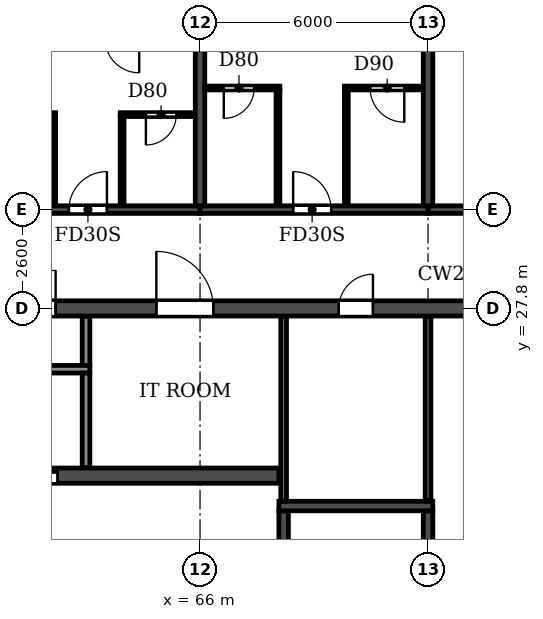
"""IFC4 building model, lengths in metres.
Left out: names, types, materials, properties, quantities, classifications, styles, units other than length and angle.
Written with IfcOpenShell. Run it as: python <this file> out.ifc"""

import sys

from ifc_helpers import new_model, si_unit, direction, frame, frame_2d, origin, place, context, subcontext, project, spatial, rectangle, extrude, element, fill, save


model = new_model("IFC4")
c1 = context("Model", 3, precision=1e-05, world=origin(), true_north=direction((0.0, 1.0)))
c2 = subcontext(c1, "Body", "Model", "MODEL_VIEW")
j1 = project(units=[si_unit("LENGTHUNIT", "METRE"), si_unit("PLANEANGLEUNIT", "RADIAN")], contexts=[c1])
p1 = place(None, origin())
s1 = spatial("IfcSite", under=j1, at=p1, CompositionType="ELEMENT")
p2 = place(p1, origin())
s2 = spatial("IfcBuilding", under=s1, at=p2, CompositionType="ELEMENT")
p3 = place(p2, frame((0.0, 0.0, 181.8)))
s3 = spatial("IfcBuildingStorey", under=s2, at=p3, CompositionType="ELEMENT", Elevation=181.8)
for number, where, z_axis, x_axis in (
    (1, (66.0, 30.5, 0.0), (0.0, 0.0, 1.0), (0.0, 1.0, 0.0)),
    (2, (72.0, 30.5, 0.0), (0.0, 0.0, 1.0), (0.0, 1.0, 0.0)),
):
    element("IfcWall", number, at=place(p3, frame(where, z_axis=z_axis, x_axis=x_axis)), inside=s3, PredefinedType="SHEAR", context=c2, shape_type="SweptSolid", body=[
        extrude(rectangle(XDim=10.5, YDim=0.25, at=frame_2d((5.25, 0.0))), origin(), (0.0, 0.0, 1.0), 3.08),
    ])
p4 = place(p3, frame((60.0, 30.4, 0.0), z_axis=(0.0, 0.0, 1.0), x_axis=(1.0, 0.0, 0.0)))
e3 = element("IfcWall", 3, at=p4, inside=s3, PredefinedType="SHEAR", context=c2, shape_type="SweptSolid", body=[
    extrude(rectangle(XDim=6.0, YDim=0.2, at=frame_2d((3.0, 0.0))), origin(), (0.0, 0.0, 1.0), 2.48),
])
p5 = place(p4, frame((2.55, 0.0, 0.0)))
e4 = element("IfcOpeningElement", 4, at=p5, cuts=e3, PredefinedType="OPENING", context=c2, shape_type="SweptSolid", body=[
    extrude(rectangle(XDim=1.0, YDim=2.1, at=frame_2d((0.5, 1.05))), frame((0.0, 0.11, 0.0), z_axis=(0.0, -1.0, 0.0), x_axis=(1.0, 0.0, 0.0)), (0.0, 0.0, 1.0), 0.22),
])
p6 = place(p3, frame((66.0, 30.4, 0.0), z_axis=(0.0, 0.0, 1.0), x_axis=(1.0, 0.0, 0.0)))
e5 = element("IfcWall", 5, at=p6, inside=s3, PredefinedType="SHEAR", context=c2, shape_type="SweptSolid", body=[
    extrude(rectangle(XDim=6.0, YDim=0.2, at=frame_2d((3.0, 0.0))), origin(), (0.0, 0.0, 1.0), 2.48),
])
p7 = place(p6, frame((2.45, 0.0, 0.0)))
e6 = element("IfcOpeningElement", 6, at=p7, cuts=e5, PredefinedType="OPENING", context=c2, shape_type="SweptSolid", body=[
    extrude(rectangle(XDim=1.0, YDim=2.1, at=frame_2d((0.5, 1.05))), frame((0.0, 0.11, 0.0), z_axis=(0.0, -1.0, 0.0), x_axis=(1.0, 0.0, 0.0)), (0.0, 0.0, 1.0), 0.22),
])
p8 = place(p3, frame((72.0, 30.4, 0.0), z_axis=(0.0, 0.0, 1.0), x_axis=(1.0, 0.0, 0.0)))
e7 = element("IfcWall", 7, at=p8, inside=s3, PredefinedType="SHEAR", context=c2, shape_type="SweptSolid", body=[
    extrude(rectangle(XDim=6.0, YDim=0.2, at=frame_2d((3.0, 0.0))), origin(), (0.0, 0.0, 1.0), 2.48),
])
p9 = place(p8, frame((2.55, 0.0, 0.0)))
e8 = element("IfcOpeningElement", 8, at=p9, cuts=e7, PredefinedType="OPENING", context=c2, shape_type="SweptSolid", body=[
    extrude(rectangle(XDim=1.0, YDim=2.1, at=frame_2d((0.5, 1.05))), frame((0.0, 0.11, 0.0), z_axis=(0.0, -1.0, 0.0), x_axis=(1.0, 0.0, 0.0)), (0.0, 0.0, 1.0), 0.22),
])
p10 = place(p3, frame((18.2, 27.8, 0.0), z_axis=(0.0, 0.0, 1.0), x_axis=(1.0, 0.0, 0.0)))
e9 = element("IfcWall", 9, at=p10, inside=s3, PredefinedType="SOLIDWALL", context=c2, shape_type="SweptSolid", body=[
    extrude(rectangle(XDim=65.6, YDim=0.4, at=frame_2d((32.8, 0.0))), origin(), (0.0, 0.0, 1.0), 3.08),
])
p11 = place(p10, frame((0.7, 0.0, 0.0)))
e10 = element("IfcOpeningElement", 10, at=p11, cuts=e9, PredefinedType="OPENING", context=c2, shape_type="SweptSolid", body=[
    extrude(rectangle(XDim=1.0, YDim=2.1, at=frame_2d((0.5, 1.05))), frame((0.0, 0.21, 0.0), z_axis=(0.0, -1.0, 0.0), x_axis=(1.0, 0.0, 0.0)), (0.0, 0.0, 1.0), 0.42),
])
p12 = place(p10, frame((4.05, 0.0, 0.0)))
e11 = element("IfcOpeningElement", 11, at=p12, cuts=e9, PredefinedType="OPENING", context=c2, shape_type="SweptSolid", body=[
    extrude(rectangle(XDim=0.9, YDim=2.1, at=frame_2d((0.45, 1.05))), frame((0.0, 0.21, 0.0), z_axis=(0.0, -1.0, 0.0), x_axis=(1.0, 0.0, 0.0)), (0.0, 0.0, 1.0), 0.42),
])
p13 = place(p10, frame((13.25, 0.0, 0.0)))
e12 = element("IfcOpeningElement", 12, at=p13, cuts=e9, PredefinedType="OPENING", context=c2, shape_type="SweptSolid", body=[
    extrude(rectangle(XDim=0.9, YDim=2.1, at=frame_2d((0.45, 1.05))), frame((0.0, 0.21, 0.0), z_axis=(0.0, -1.0, 0.0), x_axis=(1.0, 0.0, 0.0)), (0.0, 0.0, 1.0), 0.42),
])
p14 = place(p10, frame((19.0, 0.0, 0.0)))
e13 = element("IfcOpeningElement", 13, at=p14, cuts=e9, PredefinedType="OPENING", context=c2, shape_type="SweptSolid", body=[
    extrude(rectangle(XDim=1.0, YDim=2.1, at=frame_2d((0.5, 1.05))), frame((0.0, 0.21, 0.0), z_axis=(0.0, -1.0, 0.0), x_axis=(1.0, 0.0, 0.0)), (0.0, 0.0, 1.0), 0.42),
])
p15 = place(p10, frame((24.2, 0.0, 0.0)))
e14 = element("IfcOpeningElement", 14, at=p15, cuts=e9, PredefinedType="OPENING", context=c2, shape_type="SweptSolid", body=[
    extrude(rectangle(XDim=1.0, YDim=2.1, at=frame_2d((0.5, 1.05))), frame((0.0, 0.21, 0.0), z_axis=(0.0, -1.0, 0.0), x_axis=(1.0, 0.0, 0.0)), (0.0, 0.0, 1.0), 0.42),
])
p16 = place(p10, frame((29.4, 0.0, 0.0)))
e15 = element("IfcOpeningElement", 15, at=p16, cuts=e9, PredefinedType="OPENING", context=c2, shape_type="SweptSolid", body=[
    extrude(rectangle(XDim=1.0, YDim=2.1, at=frame_2d((0.5, 1.05))), frame((0.0, 0.21, 0.0), z_axis=(0.0, -1.0, 0.0), x_axis=(1.0, 0.0, 0.0)), (0.0, 0.0, 1.0), 0.42),
])
p17 = place(p10, frame((32.3, 0.0, 0.0)))
e16 = element("IfcOpeningElement", 16, at=p17, cuts=e9, PredefinedType="OPENING", context=c2, shape_type="SweptSolid", body=[
    extrude(rectangle(XDim=1.0, YDim=2.1, at=frame_2d((0.5, 1.05))), frame((0.0, 0.21, 0.0), z_axis=(0.0, -1.0, 0.0), x_axis=(1.0, 0.0, 0.0)), (0.0, 0.0, 1.0), 0.42),
])
p18 = place(p10, frame((36.5, 0.0, 0.0)))
e17 = element("IfcOpeningElement", 17, at=p18, cuts=e9, PredefinedType="OPENING", context=c2, shape_type="SweptSolid", body=[
    extrude(rectangle(XDim=1.0, YDim=2.1, at=frame_2d((0.5, 1.05))), frame((0.0, 0.21, 0.0), z_axis=(0.0, -1.0, 0.0), x_axis=(1.0, 0.0, 0.0)), (0.0, 0.0, 1.0), 0.42),
])
p19 = place(p10, frame((40.4, 0.0, 0.0)))
e18 = element("IfcOpeningElement", 18, at=p19, cuts=e9, PredefinedType="OPENING", context=c2, shape_type="SweptSolid", body=[
    extrude(rectangle(XDim=1.0, YDim=2.1, at=frame_2d((0.5, 1.05))), frame((0.0, 0.21, 0.0), z_axis=(0.0, -1.0, 0.0), x_axis=(1.0, 0.0, 0.0)), (0.0, 0.0, 1.0), 0.42),
])
p20 = place(p10, frame((43.0, 0.0, 0.0)))
e19 = element("IfcOpeningElement", 19, at=p20, cuts=e9, PredefinedType="OPENING", context=c2, shape_type="SweptSolid", body=[
    extrude(rectangle(XDim=1.0, YDim=2.1, at=frame_2d((0.5, 1.05))), frame((0.0, 0.21, 0.0), z_axis=(0.0, -1.0, 0.0), x_axis=(1.0, 0.0, 0.0)), (0.0, 0.0, 1.0), 0.42),
])
p21 = place(p10, frame((46.65, 0.0, 0.0)))
e20 = element("IfcOpeningElement", 20, at=p21, cuts=e9, PredefinedType="OPENING", context=c2, shape_type="SweptSolid", body=[
    extrude(rectangle(XDim=1.5, YDim=2.1, at=frame_2d((0.75, 1.05))), frame((0.0, 0.21, 0.0), z_axis=(0.0, -1.0, 0.0), x_axis=(1.0, 0.0, 0.0)), (0.0, 0.0, 1.0), 0.42),
])
p22 = place(p10, frame((51.45, 0.0, 0.0)))
e21 = element("IfcOpeningElement", 21, at=p22, cuts=e9, PredefinedType="OPENING", context=c2, shape_type="SweptSolid", body=[
    extrude(rectangle(XDim=0.9, YDim=2.1, at=frame_2d((0.45, 1.05))), frame((0.0, 0.21, 0.0), z_axis=(0.0, -1.0, 0.0), x_axis=(1.0, 0.0, 0.0)), (0.0, 0.0, 1.0), 0.42),
])
p23 = place(p10, frame((60.65, 0.0, 0.0)))
e22 = element("IfcOpeningElement", 22, at=p23, cuts=e9, PredefinedType="OPENING", context=c2, shape_type="SweptSolid", body=[
    extrude(rectangle(XDim=0.9, YDim=2.1, at=frame_2d((0.45, 1.05))), frame((0.0, 0.21, 0.0), z_axis=(0.0, -1.0, 0.0), x_axis=(1.0, 0.0, 0.0)), (0.0, 0.0, 1.0), 0.42),
])
p24 = place(p10, frame((63.9, 0.0, 0.0)))
e23 = element("IfcOpeningElement", 23, at=p24, cuts=e9, PredefinedType="OPENING", context=c2, shape_type="SweptSolid", body=[
    extrude(rectangle(XDim=1.0, YDim=2.1, at=frame_2d((0.5, 1.05))), frame((0.0, 0.21, 0.0), z_axis=(0.0, -1.0, 0.0), x_axis=(1.0, 0.0, 0.0)), (0.0, 0.0, 1.0), 0.42),
])
p25 = place(p3, frame((33.925, 23.4, 0.0), z_axis=(0.0, 0.0, 1.0), x_axis=(1.0, 0.0, 0.0)))
e24 = element("IfcWall", 24, at=p25, inside=s3, PredefinedType="SOLIDWALL", context=c2, shape_type="SweptSolid", body=[
    extrude(rectangle(XDim=34.15, YDim=0.4, at=frame_2d((17.075, 0.0))), origin(), (0.0, 0.0, 1.0), 3.08),
])
p26 = place(p25, frame((16.175, 0.0, 0.0)))
e25 = element("IfcOpeningElement", 25, at=p26, cuts=e24, PredefinedType="OPENING", context=c2, shape_type="SweptSolid", body=[
    extrude(rectangle(XDim=1.8, YDim=2.1, at=frame_2d((0.9, 1.05))), frame((0.0, 0.21, 0.0), z_axis=(0.0, -1.0, 0.0), x_axis=(1.0, 0.0, 0.0)), (0.0, 0.0, 1.0), 0.42),
])
p27 = place(p25, frame((0.625, 0.0, 0.0)))
e26 = element("IfcOpeningElement", 26, at=p27, cuts=e24, PredefinedType="OPENING", context=c2, shape_type="SweptSolid", body=[
    extrude(rectangle(XDim=1.1, YDim=2.1, at=frame_2d((0.55, 1.05))), frame((0.0, 0.21, 0.0), z_axis=(0.0, -1.0, 0.0), x_axis=(1.0, 0.0, 0.0)), (0.0, 0.0, 1.0), 0.42),
])
p28 = place(p25, frame((3.225, 0.0, 0.0)))
e27 = element("IfcOpeningElement", 27, at=p28, cuts=e24, PredefinedType="OPENING", context=c2, shape_type="SweptSolid", body=[
    extrude(rectangle(XDim=1.1, YDim=2.1, at=frame_2d((0.55, 1.05))), frame((0.0, 0.21, 0.0), z_axis=(0.0, -1.0, 0.0), x_axis=(1.0, 0.0, 0.0)), (0.0, 0.0, 1.0), 0.42),
])
p29 = place(p25, frame((5.825, 0.0, 0.0)))
e28 = element("IfcOpeningElement", 28, at=p29, cuts=e24, PredefinedType="OPENING", context=c2, shape_type="SweptSolid", body=[
    extrude(rectangle(XDim=1.1, YDim=2.1, at=frame_2d((0.55, 1.05))), frame((0.0, 0.21, 0.0), z_axis=(0.0, -1.0, 0.0), x_axis=(1.0, 0.0, 0.0)), (0.0, 0.0, 1.0), 0.42),
])
p30 = place(p25, frame((8.425, 0.0, 0.0)))
e29 = element("IfcOpeningElement", 29, at=p30, cuts=e24, PredefinedType="OPENING", context=c2, shape_type="SweptSolid", body=[
    extrude(rectangle(XDim=1.1, YDim=2.1, at=frame_2d((0.55, 1.05))), frame((0.0, 0.21, 0.0), z_axis=(0.0, -1.0, 0.0), x_axis=(1.0, 0.0, 0.0)), (0.0, 0.0, 1.0), 0.42),
])
p31 = place(p25, frame((11.025, 0.0, 0.0)))
e30 = element("IfcOpeningElement", 30, at=p31, cuts=e24, PredefinedType="OPENING", context=c2, shape_type="SweptSolid", body=[
    extrude(rectangle(XDim=1.1, YDim=2.1, at=frame_2d((0.55, 1.05))), frame((0.0, 0.21, 0.0), z_axis=(0.0, -1.0, 0.0), x_axis=(1.0, 0.0, 0.0)), (0.0, 0.0, 1.0), 0.42),
])
p32 = place(p25, frame((13.625, 0.0, 0.0)))
e31 = element("IfcOpeningElement", 31, at=p32, cuts=e24, PredefinedType="OPENING", context=c2, shape_type="SweptSolid", body=[
    extrude(rectangle(XDim=1.1, YDim=2.1, at=frame_2d((0.55, 1.05))), frame((0.0, 0.21, 0.0), z_axis=(0.0, -1.0, 0.0), x_axis=(1.0, 0.0, 0.0)), (0.0, 0.0, 1.0), 0.42),
])
p33 = place(p25, frame((27.225, 0.0, 0.0)))
e32 = element("IfcOpeningElement", 32, at=p33, cuts=e24, PredefinedType="OPENING", context=c2, shape_type="SweptSolid", body=[
    extrude(rectangle(XDim=1.1, YDim=2.1, at=frame_2d((0.55, 1.05))), frame((0.0, 0.21, 0.0), z_axis=(0.0, -1.0, 0.0), x_axis=(1.0, 0.0, 0.0)), (0.0, 0.0, 1.0), 0.42),
])
p34 = place(p3, frame((68.2, 14.8, 0.0), z_axis=(0.0, 0.0, 1.0), x_axis=(0.0, 1.0, 0.0)))
e33 = element("IfcWall", 33, at=p34, inside=s3, PredefinedType="SOLIDWALL", context=c2, shape_type="SweptSolid", body=[
    extrude(rectangle(XDim=7.675, YDim=0.25, at=frame_2d((3.837, 0.0))), origin(), (0.0, 0.0, 1.0), 3.08),
])
p35 = place(p34, frame((0.5, 0.0, 0.0)))
e34 = element("IfcOpeningElement", 34, at=p35, cuts=e33, PredefinedType="OPENING", context=c2, shape_type="SweptSolid", body=[
    extrude(rectangle(XDim=1.0, YDim=2.1, at=frame_2d((0.5, 1.05))), frame((0.0, 0.135, 0.0), z_axis=(0.0, -1.0, 0.0), x_axis=(1.0, 0.0, 0.0)), (0.0, 0.0, 1.0), 0.27),
])
p36 = place(p3, frame((72.0, 14.8, 0.0), z_axis=(0.0, 0.0, 1.0), x_axis=(0.0, 1.0, 0.0)))
e35 = element("IfcWall", 35, at=p36, inside=s3, PredefinedType="SOLIDWALL", context=c2, shape_type="SweptSolid", body=[
    extrude(rectangle(XDim=7.675, YDim=0.25, at=frame_2d((3.837, 0.0))), origin(), (0.0, 0.0, 1.0), 3.08),
])
p37 = place(p3, frame((68.075, 22.6, 0.0), z_axis=(0.0, 0.0, 1.0), x_axis=(1.0, 0.0, 0.0)))
e36 = element("IfcWall", 36, at=p37, inside=s3, PredefinedType="SOLIDWALL", context=c2, shape_type="SweptSolid", body=[
    extrude(rectangle(XDim=4.05, YDim=0.25, at=frame_2d((2.025, 0.0))), origin(), (0.0, 0.0, 1.0), 3.08),
])
p38 = place(p3, frame((60.135, 32.9, 0.0), z_axis=(0.0, 0.0, 1.0), x_axis=(1.0, 0.0, 0.0)))
e37 = element("IfcWall", 37, at=p38, inside=s3, PredefinedType="PARTITIONING", context=c2, shape_type="SweptSolid", body=[
    extrude(rectangle(XDim=2.065, YDim=0.1, at=frame_2d((1.032, 0.0))), origin(), (0.0, 0.0, 1.0), 3.08),
])
p39 = place(p38, frame((0.49, 0.0, 0.0)))
e38 = element("IfcOpeningElement", 38, at=p39, cuts=e37, PredefinedType="OPENING", context=c2, shape_type="SweptSolid", body=[
    extrude(rectangle(XDim=0.9, YDim=2.1, at=frame_2d((0.45, 1.05))), frame((0.0, 0.06, 0.0), z_axis=(0.0, -1.0, 0.0), x_axis=(1.0, 0.0, 0.0)), (0.0, 0.0, 1.0), 0.12),
])
p40 = place(p3, frame((63.9, 32.9, 0.0), z_axis=(0.0, 0.0, 1.0), x_axis=(1.0, 0.0, 0.0)))
e39 = element("IfcWall", 39, at=p40, inside=s3, PredefinedType="PARTITIONING", context=c2, shape_type="SweptSolid", body=[
    extrude(rectangle(XDim=1.965, YDim=0.1, at=frame_2d((0.982, 0.0))), origin(), (0.0, 0.0, 1.0), 3.08),
])
p41 = place(p40, frame((0.675, 0.0, 0.0)))
e40 = element("IfcOpeningElement", 40, at=p41, cuts=e39, PredefinedType="OPENING", context=c2, shape_type="SweptSolid", body=[
    extrude(rectangle(XDim=0.8, YDim=2.1, at=frame_2d((0.4, 1.05))), frame((0.0, 0.06, 0.0), z_axis=(0.0, -1.0, 0.0), x_axis=(1.0, 0.0, 0.0)), (0.0, 0.0, 1.0), 0.12),
])
p42 = place(p3, frame((66.135, 33.6, 0.0), z_axis=(0.0, 0.0, 1.0), x_axis=(1.0, 0.0, 0.0)))
e41 = element("IfcWall", 41, at=p42, inside=s3, PredefinedType="PARTITIONING", context=c2, shape_type="SweptSolid", body=[
    extrude(rectangle(XDim=1.965, YDim=0.1, at=frame_2d((0.982, 0.0))), origin(), (0.0, 0.0, 1.0), 3.08),
])
p43 = place(p42, frame((0.49, 0.0, 0.0)))
e42 = element("IfcOpeningElement", 42, at=p43, cuts=e41, PredefinedType="OPENING", context=c2, shape_type="SweptSolid", body=[
    extrude(rectangle(XDim=0.8, YDim=2.1, at=frame_2d((0.4, 1.05))), frame((0.0, 0.06, 0.0), z_axis=(0.0, -1.0, 0.0), x_axis=(1.0, 0.0, 0.0)), (0.0, 0.0, 1.0), 0.12),
])
p44 = place(p3, frame((69.8, 33.6, 0.0), z_axis=(0.0, 0.0, 1.0), x_axis=(1.0, 0.0, 0.0)))
e43 = element("IfcWall", 43, at=p44, inside=s3, PredefinedType="PARTITIONING", context=c2, shape_type="SweptSolid", body=[
    extrude(rectangle(XDim=2.065, YDim=0.1, at=frame_2d((1.032, 0.0))), origin(), (0.0, 0.0, 1.0), 3.08),
])
p45 = place(p44, frame((0.675, 0.0, 0.0)))
e44 = element("IfcOpeningElement", 44, at=p45, cuts=e43, PredefinedType="OPENING", context=c2, shape_type="SweptSolid", body=[
    extrude(rectangle(XDim=0.9, YDim=2.1, at=frame_2d((0.45, 1.05))), frame((0.0, 0.06, 0.0), z_axis=(0.0, -1.0, 0.0), x_axis=(1.0, 0.0, 0.0)), (0.0, 0.0, 1.0), 0.12),
])
for number, where, z_axis, x_axis in (
    (45, (62.15, 30.51, 0.0), (0.0, 0.0, 1.0), (0.0, 1.0, 0.0)),
    (46, (63.95, 30.51, 0.0), (0.0, 0.0, 1.0), (0.0, 1.0, 0.0)),
):
    element("IfcWall", number, at=place(p3, frame(where, z_axis=z_axis, x_axis=x_axis)), inside=s3, PredefinedType="PARTITIONING", context=c2, shape_type="SweptSolid", body=[
        extrude(rectangle(XDim=2.34, YDim=0.1, at=frame_2d((1.17, 0.0))), origin(), (0.0, 0.0, 1.0), 3.08),
    ])
for number, where, z_axis, x_axis in (
    (47, (68.05, 30.51, 0.0), (0.0, 0.0, 1.0), (0.0, 1.0, 0.0)),
    (48, (69.85, 30.51, 0.0), (0.0, 0.0, 1.0), (0.0, 1.0, 0.0)),
):
    element("IfcWall", number, at=place(p3, frame(where, z_axis=z_axis, x_axis=x_axis)), inside=s3, PredefinedType="PARTITIONING", context=c2, shape_type="SweptSolid", body=[
        extrude(rectangle(XDim=3.04, YDim=0.1, at=frame_2d((1.52, 0.0))), origin(), (0.0, 0.0, 1.0), 3.08),
    ])
p46 = place(p3, frame((63.0, 26.3, 0.0), z_axis=(0.0, 0.0, 1.0), x_axis=(0.0, 1.0, 0.0)))
e49 = element("IfcWall", 49, at=p46, inside=s3, PredefinedType="PARTITIONING", context=c2, shape_type="SweptSolid", body=[
    extrude(rectangle(XDim=1.29, YDim=0.2, at=frame_2d((0.645, 0.0))), origin(), (0.0, 0.0, 1.0), 3.08),
])
for number, where, z_axis, x_axis in (
    (50, (68.2, 22.735, 0.0), (0.0, 0.0, 1.0), (0.0, 1.0, 0.0)),
    (51, (72.0, 22.735, 0.0), (0.0, 0.0, 1.0), (0.0, 1.0, 0.0)),
):
    element("IfcWall", number, at=place(p3, frame(where, z_axis=z_axis, x_axis=x_axis)), inside=s3, PredefinedType="PARTITIONING", context=c2, shape_type="SweptSolid", body=[
        extrude(rectangle(XDim=4.855, YDim=0.15, at=frame_2d((2.427, 0.0))), origin(), (0.0, 0.0, 1.0), 3.08),
    ])
p47 = place(p3, frame((57.7, 26.2, 0.0), z_axis=(0.0, 0.0, 1.0), x_axis=(1.0, 0.0, 0.0)))
e52 = element("IfcWall", 52, at=p47, inside=s3, PredefinedType="PARTITIONING", context=c2, shape_type="SweptSolid", body=[
    extrude(rectangle(XDim=5.4, YDim=0.2, at=frame_2d((2.7, 0.0))), origin(), (0.0, 0.0, 1.0), 3.08),
])
p48 = place(p3, frame((63.0, 23.61, 0.0), z_axis=(0.0, 0.0, 1.0), x_axis=(0.0, 1.0, 0.0)))
e53 = element("IfcWall", 53, at=p48, inside=s3, PredefinedType="PARTITIONING", context=c2, shape_type="SweptSolid", body=[
    extrude(rectangle(XDim=2.49, YDim=0.2, at=frame_2d((1.245, 0.0))), origin(), (0.0, 0.0, 1.0), 3.08),
])
p49 = place(p20, origin())
e54 = element("IfcDoor", 54, at=p49, inside=s3, OperationType="SINGLE_SWING_RIGHT", PredefinedType="DOOR", context=c2, shape_type="SweptSolid", body=[
    extrude(rectangle(XDim=1.0, YDim=2.1, at=frame_2d((0.5, 1.05))), frame((0.0, 0.025, 0.0), z_axis=(0.0, -1.0, 0.0), x_axis=(1.0, 0.0, 0.0)), (0.0, 0.0, 1.0), 0.05),
])
fill(e19, e54)
p50 = place(p21, origin())
e55 = element("IfcDoor", 55, at=p50, inside=s3, OperationType="DOUBLE_DOOR_SINGLE_SWING", PredefinedType="DOOR", context=c2, shape_type="SweptSolid", body=[
    extrude(rectangle(XDim=1.5, YDim=2.1, at=frame_2d((0.75, 1.05))), frame((0.0, 0.025, 0.0), z_axis=(0.0, -1.0, 0.0), x_axis=(1.0, 0.0, 0.0)), (0.0, 0.0, 1.0), 0.05),
])
fill(e20, e55)
p51 = place(p22, origin())
e56 = element("IfcDoor", 56, at=p51, inside=s3, OperationType="SINGLE_SWING_RIGHT", PredefinedType="DOOR", context=c2, shape_type="SweptSolid", body=[
    extrude(rectangle(XDim=0.9, YDim=2.1, at=frame_2d((0.45, 1.05))), frame((0.0, 0.025, 0.0), z_axis=(0.0, -1.0, 0.0), x_axis=(1.0, 0.0, 0.0)), (0.0, 0.0, 1.0), 0.05),
])
fill(e21, e56)
p52 = place(p5, origin())
e57 = element("IfcDoor", 57, at=p52, inside=s3, OperationType="SINGLE_SWING_RIGHT", PredefinedType="DOOR", context=c2, shape_type="SweptSolid", body=[
    extrude(rectangle(XDim=1.0, YDim=2.1, at=frame_2d((0.5, 1.05))), frame((0.0, 0.025, 0.0), z_axis=(0.0, -1.0, 0.0), x_axis=(1.0, 0.0, 0.0)), (0.0, 0.0, 1.0), 0.05),
])
fill(e4, e57)
p53 = place(p41, frame((0.8, 0.0, 0.0), z_axis=(0.0, 0.0, 1.0), x_axis=(-1.0, 0.0, 0.0)))
e58 = element("IfcDoor", 58, at=p53, inside=s3, OperationType="SINGLE_SWING_RIGHT", PredefinedType="DOOR", context=c2, shape_type="SweptSolid", body=[
    extrude(rectangle(XDim=0.8, YDim=2.1, at=frame_2d((0.4, 1.05))), frame((0.0, 0.025, 0.0), z_axis=(0.0, -1.0, 0.0), x_axis=(1.0, 0.0, 0.0)), (0.0, 0.0, 1.0), 0.05),
])
fill(e40, e58)
p54 = place(p43, frame((0.8, 0.0, 0.0), z_axis=(0.0, 0.0, 1.0), x_axis=(-1.0, 0.0, 0.0)))
e59 = element("IfcDoor", 59, at=p54, inside=s3, OperationType="SINGLE_SWING_RIGHT", PredefinedType="DOOR", context=c2, shape_type="SweptSolid", body=[
    extrude(rectangle(XDim=0.8, YDim=2.1, at=frame_2d((0.4, 1.05))), frame((0.0, 0.025, 0.0), z_axis=(0.0, -1.0, 0.0), x_axis=(1.0, 0.0, 0.0)), (0.0, 0.0, 1.0), 0.05),
])
fill(e42, e59)
p55 = place(p7, origin())
e60 = element("IfcDoor", 60, at=p55, inside=s3, OperationType="SINGLE_SWING_LEFT", PredefinedType="DOOR", context=c2, shape_type="SweptSolid", body=[
    extrude(rectangle(XDim=1.0, YDim=2.1, at=frame_2d((0.5, 1.05))), frame((0.0, 0.025, 0.0), z_axis=(0.0, -1.0, 0.0), x_axis=(1.0, 0.0, 0.0)), (0.0, 0.0, 1.0), 0.05),
])
fill(e6, e60)
p56 = place(p45, frame((0.9, 0.0, 0.0), z_axis=(0.0, 0.0, 1.0), x_axis=(-1.0, 0.0, 0.0)))
e61 = element("IfcDoor", 61, at=p56, inside=s3, OperationType="SINGLE_SWING_LEFT", PredefinedType="DOOR", context=c2, shape_type="SweptSolid", body=[
    extrude(rectangle(XDim=0.9, YDim=2.1, at=frame_2d((0.45, 1.05))), frame((0.0, 0.025, 0.0), z_axis=(0.0, -1.0, 0.0), x_axis=(1.0, 0.0, 0.0)), (0.0, 0.0, 1.0), 0.05),
])
fill(e44, e61)
p57 = place(p33, origin())
e62 = element("IfcDoor", 62, at=p57, inside=s3, OperationType="DOUBLE_DOOR_SLIDING", PredefinedType="DOOR", context=c2, shape_type="SweptSolid", body=[
    extrude(rectangle(XDim=1.1, YDim=2.1, at=frame_2d((0.55, 1.05))), frame((0.0, 0.025, 0.0), z_axis=(0.0, -1.0, 0.0), x_axis=(1.0, 0.0, 0.0)), (0.0, 0.0, 1.0), 0.05),
])
fill(e32, e62)
save(model, sys.argv[1])
